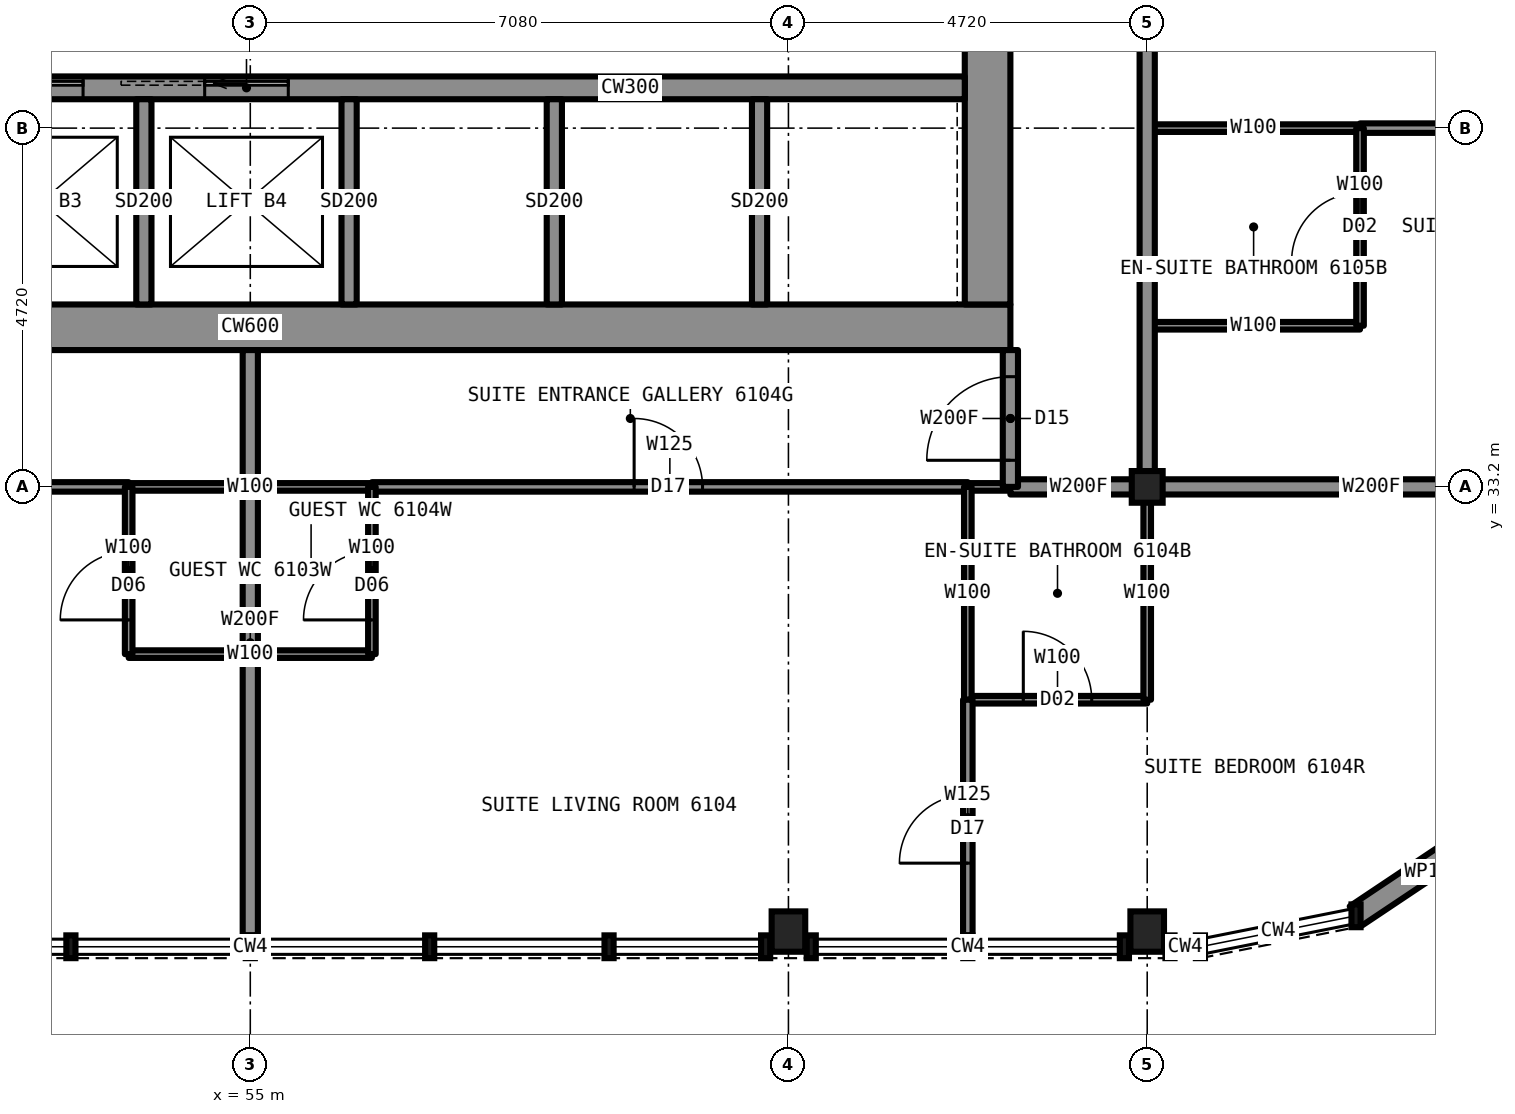
"""IFC4 building model, lengths in metres.
Left out: names, types, materials, properties, quantities, classifications, styles, units other than length and angle.
Written with IfcOpenShell. Run it as: python <this file> out.ifc"""

import sys

from ifc_helpers import new_model, si_unit, direction, frame, frame_2d, origin, origin_2d, place, context, subcontext, project, spatial, rectangle, i_section, extrude, element, fill, save


model = new_model("IFC4")
c1 = context("Model", 3, precision=1e-05, world=origin(), true_north=direction((0.0, 1.0)))
c2 = subcontext(c1, "Body", "Model", "MODEL_VIEW")
j1 = project(units=[si_unit("LENGTHUNIT", "METRE"), si_unit("PLANEANGLEUNIT", "RADIAN")], contexts=[c1])
p1 = place(None, origin())
s1 = spatial("IfcSite", under=j1, at=p1, CompositionType="ELEMENT")
p2 = place(p1, origin())
s2 = spatial("IfcBuilding", under=s1, at=p2, CompositionType="ELEMENT")
p3 = place(p2, frame((0.0, 0.0, 226.7)))
s3 = spatial("IfcBuildingStorey", under=s2, at=p3, CompositionType="ELEMENT", Elevation=226.7)
for number, where, z_axis, x_axis in (
    (1, (62.08, 27.35, 0.0), (0.0, 0.0, 1.0), (1.0, 0.0, 0.0)),
    (2, (66.8, 27.35, 0.0), (0.0, 0.0, 1.0), (1.0, 0.0, 0.0)),
):
    element("IfcColumn", number, at=place(p3, frame(where, z_axis=z_axis, x_axis=x_axis)), inside=s3, PredefinedType="COLUMN", context=c2, shape_type="SweptSolid", body=[
        extrude(i_section(OverallWidth=0.442, OverallDepth=0.531, WebThickness=0.066, FlangeThickness=0.106, at=origin_2d()), origin(), (0.0, 0.0, 1.0), 3.5),
    ])
p4 = place(p3, frame((66.8, 33.2, 0.0), z_axis=(0.0, 0.0, 1.0), x_axis=(1.0, 0.0, 0.0)))
e3 = element("IfcColumn", 3, at=p4, inside=s3, PredefinedType="COLUMN", context=c2, shape_type="SweptSolid", body=[
    extrude(i_section(OverallWidth=0.406, OverallDepth=0.417, WebThickness=0.03, FlangeThickness=0.048, at=origin_2d()), origin(), (0.0, 0.0, 1.0), 3.5),
])
p5 = place(p3, frame((45.0, 35.3, 0.0), z_axis=(0.0, 0.0, 1.0), x_axis=(1.0, 0.0, 0.0)))
e4 = element("IfcWall", 4, at=p5, inside=s3, PredefinedType="SHEAR", context=c2, shape_type="SweptSolid", body=[
    extrude(rectangle(XDim=20.0, YDim=0.6, at=frame_2d((10.0, 0.0))), origin(), (0.0, 0.0, 1.0), 3.5),
])
p6 = place(p3, frame((64.7, 35.6, 0.0), z_axis=(0.0, 0.0, 1.0), x_axis=(0.0, 1.0, 0.0)))
e5 = element("IfcWall", 5, at=p6, inside=s3, PredefinedType="SHEAR", context=c2, shape_type="SweptSolid", body=[
    extrude(rectangle(XDim=18.8, YDim=0.6, at=frame_2d((9.4, 0.0))), origin(), (0.0, 0.0, 1.0), 3.5),
])
p7 = place(p6, frame((13.4, 0.0, 0.0)))
e6 = element("IfcOpeningElement", 6, at=p7, cuts=e5, PredefinedType="OPENING", context=c2, shape_type="SweptSolid", body=[
    extrude(rectangle(XDim=1.8, YDim=2.2, at=frame_2d((0.9, 1.1))), frame((0.0, 0.31, 0.0), z_axis=(0.0, -1.0, 0.0), x_axis=(1.0, 0.0, 0.0)), (0.0, 0.0, 1.0), 0.62),
])
p8 = place(p6, frame((3.6, 0.0, 0.0)))
e7 = element("IfcOpeningElement", 7, at=p8, cuts=e5, PredefinedType="OPENING", context=c2, shape_type="SweptSolid", body=[
    extrude(rectangle(XDim=1.8, YDim=2.2, at=frame_2d((0.9, 1.1))), frame((0.0, 0.31, 0.0), z_axis=(0.0, -1.0, 0.0), x_axis=(1.0, 0.0, 0.0)), (0.0, 0.0, 1.0), 0.62),
])
p9 = place(p3, frame((45.6, 38.45, 0.0), z_axis=(0.0, 0.0, 1.0), x_axis=(1.0, 0.0, 0.0)))
e8 = element("IfcWall", 8, at=p9, inside=s3, PredefinedType="SHEAR", context=c2, shape_type="SweptSolid", body=[
    extrude(rectangle(XDim=18.8, YDim=0.3, at=frame_2d((9.4, 0.0))), origin(), (0.0, 0.0, 1.0), 3.5),
])
p10 = place(p9, frame((0.7, 0.0, 0.0)))
e9 = element("IfcOpeningElement", 9, at=p10, cuts=e8, PredefinedType="OPENING", context=c2, shape_type="SweptSolid", body=[
    extrude(rectangle(XDim=1.1, YDim=2.2, at=frame_2d((0.55, 1.1))), frame((0.0, 0.16, 0.0), z_axis=(0.0, -1.0, 0.0), x_axis=(1.0, 0.0, 0.0)), (0.0, 0.0, 1.0), 0.32),
])
p11 = place(p9, frame((3.4, 0.0, 0.0)))
e10 = element("IfcOpeningElement", 10, at=p11, cuts=e8, PredefinedType="OPENING", context=c2, shape_type="SweptSolid", body=[
    extrude(rectangle(XDim=1.1, YDim=2.2, at=frame_2d((0.55, 1.1))), frame((0.0, 0.16, 0.0), z_axis=(0.0, -1.0, 0.0), x_axis=(1.0, 0.0, 0.0)), (0.0, 0.0, 1.0), 0.32),
])
p12 = place(p9, frame((6.1, 0.0, 0.0)))
e11 = element("IfcOpeningElement", 11, at=p12, cuts=e8, PredefinedType="OPENING", context=c2, shape_type="SweptSolid", body=[
    extrude(rectangle(XDim=1.1, YDim=2.2, at=frame_2d((0.55, 1.1))), frame((0.0, 0.16, 0.0), z_axis=(0.0, -1.0, 0.0), x_axis=(1.0, 0.0, 0.0)), (0.0, 0.0, 1.0), 0.32),
])
p13 = place(p9, frame((8.8, 0.0, 0.0)))
e12 = element("IfcOpeningElement", 12, at=p13, cuts=e8, PredefinedType="OPENING", context=c2, shape_type="SweptSolid", body=[
    extrude(rectangle(XDim=1.1, YDim=2.2, at=frame_2d((0.55, 1.1))), frame((0.0, 0.16, 0.0), z_axis=(0.0, -1.0, 0.0), x_axis=(1.0, 0.0, 0.0)), (0.0, 0.0, 1.0), 0.32),
])
p14 = place(p3, frame((53.4, 33.2, 0.0), z_axis=(0.0, 0.0, 1.0), x_axis=(1.0, 0.0, 0.0)))
e13 = element("IfcWall", 13, at=p14, inside=s3, PredefinedType="PARTITIONING", context=c2, shape_type="SweptSolid", body=[
    extrude(rectangle(XDim=3.2, YDim=0.1, at=frame_2d((1.6, 0.0))), origin(), (0.0, 0.0, 1.0), 3.33),
])
p15 = place(p3, frame((64.44, 33.2, 0.0), z_axis=(0.0, 0.0, 1.0), x_axis=(1.0, 0.0, 0.0)))
e14 = element("IfcWall", 14, at=p15, inside=s3, PredefinedType="PARTITIONING", context=c2, shape_type="SweptSolid", body=[
    extrude(rectangle(XDim=0.56, YDim=0.1, at=frame_2d((0.28, 0.0))), origin(), (0.0, 0.0, 1.0), 3.33),
])
p16 = place(p3, frame((65.0, 33.2, 0.0), z_axis=(0.0, 0.0, 1.0), x_axis=(1.0, 0.0, 0.0)))
e15 = element("IfcWall", 15, at=p16, inside=s3, PredefinedType="PARTITIONING", context=c2, shape_type="SweptSolid", body=[
    extrude(rectangle(XDim=1.8, YDim=0.2, at=frame_2d((0.9, 0.0))), origin(), (0.0, 0.0, 1.0), 3.33),
])
p17 = place(p3, frame((66.8, 33.2, 0.0), z_axis=(0.0, 0.0, 1.0), x_axis=(1.0, 0.0, 0.0)))
e16 = element("IfcWall", 16, at=p17, inside=s3, PredefinedType="PARTITIONING", context=c2, shape_type="SweptSolid", body=[
    extrude(rectangle(XDim=5.9, YDim=0.2, at=frame_2d((2.95, 0.0))), origin(), (0.0, 0.0, 1.0), 2.573),
])
p18 = place(p3, frame((45.56, 33.2, 0.0), z_axis=(0.0, 0.0, 1.0), x_axis=(1.0, 0.0, 0.0)))
e17 = element("IfcWall", 17, at=p18, inside=s3, PredefinedType="PARTITIONING", context=c2, shape_type="SweptSolid", body=[
    extrude(rectangle(XDim=7.84, YDim=0.125, at=frame_2d((3.92, 0.0))), origin(), (0.0, 0.0, 1.0), 3.33),
])
p19 = place(p18, frame((3.49, 0.0, 0.0)))
e18 = element("IfcOpeningElement", 18, at=p19, cuts=e17, PredefinedType="OPENING", context=c2, shape_type="SweptSolid", body=[
    extrude(rectangle(XDim=0.9, YDim=2.2, at=frame_2d((0.45, 1.1))), frame((0.0, 0.073, 0.0), z_axis=(0.0, -1.0, 0.0), x_axis=(1.0, 0.0, 0.0)), (0.0, 0.0, 1.0), 0.145),
])
p20 = place(p3, frame((56.6, 33.2, 0.0), z_axis=(0.0, 0.0, 1.0), x_axis=(1.0, 0.0, 0.0)))
e19 = element("IfcWall", 19, at=p20, inside=s3, PredefinedType="PARTITIONING", context=c2, shape_type="SweptSolid", body=[
    extrude(rectangle(XDim=7.84, YDim=0.125, at=frame_2d((3.92, 0.0))), origin(), (0.0, 0.0, 1.0), 3.33),
])
p21 = place(p20, frame((3.45, 0.0, 0.0)))
e20 = element("IfcOpeningElement", 20, at=p21, cuts=e19, PredefinedType="OPENING", context=c2, shape_type="SweptSolid", body=[
    extrude(rectangle(XDim=0.9, YDim=2.2, at=frame_2d((0.45, 1.1))), frame((0.0, 0.073, 0.0), z_axis=(0.0, -1.0, 0.0), x_axis=(1.0, 0.0, 0.0)), (0.0, 0.0, 1.0), 0.145),
])
p22 = place(p3, frame((53.4, 31.0, 0.0), z_axis=(0.0, 0.0, 1.0), x_axis=(1.0, 0.0, 0.0)))
e21 = element("IfcWall", 21, at=p22, inside=s3, PredefinedType="PARTITIONING", context=c2, shape_type="SweptSolid", body=[
    extrude(rectangle(XDim=3.2, YDim=0.1, at=frame_2d((1.6, 0.0))), origin(), (0.0, 0.0, 1.0), 3.33),
])
p23 = place(p3, frame((64.44, 30.4, 0.0), z_axis=(0.0, 0.0, 1.0), x_axis=(1.0, 0.0, 0.0)))
e22 = element("IfcWall", 22, at=p23, inside=s3, PredefinedType="PARTITIONING", context=c2, shape_type="SweptSolid", body=[
    extrude(rectangle(XDim=2.36, YDim=0.1, at=frame_2d((1.18, 0.0))), origin(), (0.0, 0.0, 1.0), 3.33),
])
p24 = place(p23, frame((0.73, 0.0, 0.0)))
e23 = element("IfcOpeningElement", 23, at=p24, cuts=e22, PredefinedType="OPENING", context=c2, shape_type="SweptSolid", body=[
    extrude(rectangle(XDim=0.9, YDim=2.1, at=frame_2d((0.45, 1.05))), frame((0.0, 0.06, 0.0), z_axis=(0.0, -1.0, 0.0), x_axis=(1.0, 0.0, 0.0)), (0.0, 0.0, 1.0), 0.12),
])
p25 = place(p3, frame((66.8, 37.92, 0.0), z_axis=(0.0, 0.0, 1.0), x_axis=(1.0, 0.0, 0.0)))
e24 = element("IfcWall", 24, at=p25, inside=s3, PredefinedType="PARTITIONING", context=c2, shape_type="SweptSolid", body=[
    extrude(rectangle(XDim=2.8, YDim=0.1, at=frame_2d((1.4, 0.0))), origin(), (0.0, 0.0, 1.0), 2.573),
])
p26 = place(p3, frame((69.6, 37.92, 0.0), z_axis=(0.0, 0.0, 1.0), x_axis=(1.0, 0.0, 0.0)))
e25 = element("IfcWall", 25, at=p26, inside=s3, PredefinedType="PARTITIONING", context=c2, shape_type="SweptSolid", body=[
    extrude(rectangle(XDim=3.1, YDim=0.125, at=frame_2d((1.55, 0.0))), origin(), (0.0, 0.0, 1.0), 2.573),
])
p27 = place(p26, frame((1.25, 0.0, 0.0)))
e26 = element("IfcOpeningElement", 26, at=p27, cuts=e25, PredefinedType="OPENING", context=c2, shape_type="SweptSolid", body=[
    extrude(rectangle(XDim=0.9, YDim=2.2, at=frame_2d((0.45, 1.1))), frame((0.0, 0.073, 0.0), z_axis=(0.0, -1.0, 0.0), x_axis=(1.0, 0.0, 0.0)), (0.0, 0.0, 1.0), 0.145),
])
p28 = place(p3, frame((66.8, 35.32, 0.0), z_axis=(0.0, 0.0, 1.0), x_axis=(1.0, 0.0, 0.0)))
e27 = element("IfcWall", 27, at=p28, inside=s3, PredefinedType="PARTITIONING", context=c2, shape_type="SweptSolid", body=[
    extrude(rectangle(XDim=2.8, YDim=0.1, at=frame_2d((1.4, 0.0))), origin(), (0.0, 0.0, 1.0), 3.33),
])
p29 = place(p3, frame((53.4, 31.0, 0.0), z_axis=(0.0, 0.0, 1.0), x_axis=(0.0, 1.0, 0.0)))
e28 = element("IfcWall", 28, at=p29, inside=s3, PredefinedType="PARTITIONING", context=c2, shape_type="SweptSolid", body=[
    extrude(rectangle(XDim=2.2, YDim=0.1, at=frame_2d((1.1, 0.0))), origin(), (0.0, 0.0, 1.0), 3.33),
])
p30 = place(p29, frame((0.45, 0.0, 0.0)))
e29 = element("IfcOpeningElement", 29, at=p30, cuts=e28, PredefinedType="OPENING", context=c2, shape_type="SweptSolid", body=[
    extrude(rectangle(XDim=0.9, YDim=2.1, at=frame_2d((0.45, 1.05))), frame((0.0, 0.06, 0.0), z_axis=(0.0, -1.0, 0.0), x_axis=(1.0, 0.0, 0.0)), (0.0, 0.0, 1.0), 0.12),
])
p31 = place(p3, frame((55.0, 27.3, 0.0), z_axis=(0.0, 0.0, 1.0), x_axis=(0.0, 1.0, 0.0)))
e30 = element("IfcWall", 30, at=p31, inside=s3, PredefinedType="PARTITIONING", context=c2, shape_type="SweptSolid", body=[
    extrude(rectangle(XDim=7.7, YDim=0.2, at=frame_2d((3.85, 0.0))), origin(), (0.0, 0.0, 1.0), 2.573),
])
p32 = place(p3, frame((56.6, 31.0, 0.0), z_axis=(0.0, 0.0, 1.0), x_axis=(0.0, 1.0, 0.0)))
e31 = element("IfcWall", 31, at=p32, inside=s3, PredefinedType="PARTITIONING", context=c2, shape_type="SweptSolid", body=[
    extrude(rectangle(XDim=2.2, YDim=0.1, at=frame_2d((1.1, 0.0))), origin(), (0.0, 0.0, 1.0), 3.33),
])
p33 = place(p32, frame((0.45, 0.0, 0.0)))
e32 = element("IfcOpeningElement", 32, at=p33, cuts=e31, PredefinedType="OPENING", context=c2, shape_type="SweptSolid", body=[
    extrude(rectangle(XDim=0.9, YDim=2.1, at=frame_2d((0.45, 1.05))), frame((0.0, 0.06, 0.0), z_axis=(0.0, -1.0, 0.0), x_axis=(1.0, 0.0, 0.0)), (0.0, 0.0, 1.0), 0.12),
])
p34 = place(p3, frame((65.0, 33.2, 0.0), z_axis=(0.0, 0.0, 1.0), x_axis=(0.0, 1.0, 0.0)))
e33 = element("IfcWall", 33, at=p34, inside=s3, PredefinedType="PARTITIONING", context=c2, shape_type="SweptSolid", body=[
    extrude(rectangle(XDim=1.8, YDim=0.2, at=frame_2d((0.9, 0.0))), origin(), (0.0, 0.0, 1.0), 3.33),
])
p35 = place(p34, frame((0.35, 0.0, 0.0)))
e34 = element("IfcOpeningElement", 34, at=p35, cuts=e33, PredefinedType="OPENING", context=c2, shape_type="SweptSolid", body=[
    extrude(rectangle(XDim=1.1, YDim=2.2, at=frame_2d((0.55, 1.1))), frame((0.0, 0.11, 0.0), z_axis=(0.0, -1.0, 0.0), x_axis=(1.0, 0.0, 0.0)), (0.0, 0.0, 1.0), 0.22),
])
p36 = place(p3, frame((66.8, 30.4, 0.0), z_axis=(0.0, 0.0, 1.0), x_axis=(0.0, 1.0, 0.0)))
e35 = element("IfcWall", 35, at=p36, inside=s3, PredefinedType="PARTITIONING", context=c2, shape_type="SweptSolid", body=[
    extrude(rectangle(XDim=2.8, YDim=0.1, at=frame_2d((1.4, 0.0))), origin(), (0.0, 0.0, 1.0), 2.573),
])
p37 = place(p3, frame((66.8, 33.2, 0.0), z_axis=(0.0, 0.0, 1.0), x_axis=(0.0, 1.0, 0.0)))
e36 = element("IfcWall", 36, at=p37, inside=s3, PredefinedType="PARTITIONING", context=c2, shape_type="SweptSolid", body=[
    extrude(rectangle(XDim=23.6, YDim=0.2, at=frame_2d((11.8, 0.0))), origin(), (0.0, 0.0, 1.0), 3.33),
])
p38 = place(p37, frame((8.85, 0.0, 0.0)))
e37 = element("IfcOpeningElement", 37, at=p38, cuts=e36, PredefinedType="OPENING", context=c2, shape_type="SweptSolid", body=[
    extrude(rectangle(XDim=1.1, YDim=2.2, at=frame_2d((0.55, 1.1))), frame((0.0, 0.11, 0.0), z_axis=(0.0, -1.0, 0.0), x_axis=(1.0, 0.0, 0.0)), (0.0, 0.0, 1.0), 0.22),
])
p39 = place(p37, frame((13.65, 0.0, 0.0)))
e38 = element("IfcOpeningElement", 38, at=p39, cuts=e36, PredefinedType="OPENING", context=c2, shape_type="SweptSolid", body=[
    extrude(rectangle(XDim=1.1, YDim=2.2, at=frame_2d((0.55, 1.1))), frame((0.0, 0.11, 0.0), z_axis=(0.0, -1.0, 0.0), x_axis=(1.0, 0.0, 0.0)), (0.0, 0.0, 1.0), 0.22),
])
p40 = place(p3, frame((69.6, 35.32, 0.0), z_axis=(0.0, 0.0, 1.0), x_axis=(0.0, 1.0, 0.0)))
e39 = element("IfcWall", 39, at=p40, inside=s3, PredefinedType="PARTITIONING", context=c2, shape_type="SweptSolid", body=[
    extrude(rectangle(XDim=2.6, YDim=0.1, at=frame_2d((1.3, 0.0))), origin(), (0.0, 0.0, 1.0), 3.33),
])
p41 = place(p40, frame((0.85, 0.0, 0.0)))
e40 = element("IfcOpeningElement", 40, at=p41, cuts=e39, PredefinedType="OPENING", context=c2, shape_type="SweptSolid", body=[
    extrude(rectangle(XDim=0.9, YDim=2.1, at=frame_2d((0.45, 1.05))), frame((0.0, 0.06, 0.0), z_axis=(0.0, -1.0, 0.0), x_axis=(1.0, 0.0, 0.0)), (0.0, 0.0, 1.0), 0.12),
])
p42 = place(p3, frame((64.44, 30.4, 0.0), z_axis=(0.0, 0.0, 1.0), x_axis=(0.0, 1.0, 0.0)))
e41 = element("IfcWall", 41, at=p42, inside=s3, PredefinedType="PARTITIONING", context=c2, shape_type="SweptSolid", body=[
    extrude(rectangle(XDim=2.8, YDim=0.1, at=frame_2d((1.4, 0.0))), origin(), (0.0, 0.0, 1.0), 3.33),
])
p43 = place(p3, frame((64.44, 27.3, 0.0), z_axis=(0.0, 0.0, 1.0), x_axis=(0.0, 1.0, 0.0)))
e42 = element("IfcWall", 42, at=p43, inside=s3, PredefinedType="PARTITIONING", context=c2, shape_type="SweptSolid", body=[
    extrude(rectangle(XDim=3.1, YDim=0.125, at=frame_2d((1.55, 0.0))), origin(), (0.0, 0.0, 1.0), 3.33),
])
p44 = place(p43, frame((0.95, 0.0, 0.0)))
e43 = element("IfcOpeningElement", 43, at=p44, cuts=e42, PredefinedType="OPENING", context=c2, shape_type="SweptSolid", body=[
    extrude(rectangle(XDim=0.9, YDim=2.2, at=frame_2d((0.45, 1.1))), frame((0.0, 0.073, 0.0), z_axis=(0.0, -1.0, 0.0), x_axis=(1.0, 0.0, 0.0)), (0.0, 0.0, 1.0), 0.145),
])
for number, where, z_axis, x_axis in (
    (44, (53.6, 35.6, 0.0), (0.0, 0.0, 1.0), (0.0, 1.0, 0.0)),
    (45, (56.3, 35.6, 0.0), (0.0, 0.0, 1.0), (0.0, 1.0, 0.0)),
    (46, (59.0, 35.6, 0.0), (0.0, 0.0, 1.0), (0.0, 1.0, 0.0)),
    (47, (61.7, 35.6, 0.0), (0.0, 0.0, 1.0), (0.0, 1.0, 0.0)),
):
    element("IfcWall", number, at=place(p3, frame(where, z_axis=z_axis, x_axis=x_axis)), inside=s3, PredefinedType="PARTITIONING", context=c2, shape_type="SweptSolid", body=[
        extrude(rectangle(XDim=2.7, YDim=0.2, at=frame_2d((1.35, 0.0))), origin(), (0.0, 0.0, 1.0), 3.33),
    ])
p45 = place(p3, frame((69.547, 27.557, 0.0), z_axis=(0.0, 0.0, 1.0), x_axis=(0.831420010345, 0.555644460423, 0.0)))
e48 = element("IfcWall", 48, at=p45, inside=s3, PredefinedType="SOLIDWALL", context=c2, shape_type="SweptSolid", body=[
    extrude(rectangle(XDim=2.087, YDim=0.3, at=frame_2d((1.044, 0.0))), origin(), (0.0, 0.0, 1.0), 2.83),
])
p46 = place(p30, origin())
e49 = element("IfcDoor", 49, at=p46, inside=s3, OperationType="SINGLE_SWING_LEFT", PredefinedType="DOOR", context=c2, shape_type="SweptSolid", body=[
    extrude(rectangle(XDim=0.9, YDim=2.1, at=frame_2d((0.45, 1.05))), frame((0.0, 0.025, 0.0), z_axis=(0.0, -1.0, 0.0), x_axis=(1.0, 0.0, 0.0)), (0.0, 0.0, 1.0), 0.05),
])
fill(e29, e49)
p47 = place(p21, origin())
e50 = element("IfcDoor", 50, at=p47, inside=s3, OperationType="SINGLE_SWING_LEFT", PredefinedType="DOOR", context=c2, shape_type="SweptSolid", body=[
    extrude(rectangle(XDim=0.9, YDim=2.2, at=frame_2d((0.45, 1.1))), frame((0.0, 0.025, 0.0), z_axis=(0.0, -1.0, 0.0), x_axis=(1.0, 0.0, 0.0)), (0.0, 0.0, 1.0), 0.05),
])
fill(e20, e50)
p48 = place(p24, origin())
e51 = element("IfcDoor", 51, at=p48, inside=s3, OperationType="SINGLE_SWING_RIGHT", PredefinedType="DOOR", context=c2, shape_type="SweptSolid", body=[
    extrude(rectangle(XDim=0.9, YDim=2.1, at=frame_2d((0.45, 1.05))), frame((0.0, 0.025, 0.0), z_axis=(0.0, -1.0, 0.0), x_axis=(1.0, 0.0, 0.0)), (0.0, 0.0, 1.0), 0.05),
])
fill(e23, e51)
p49 = place(p35, origin())
e52 = element("IfcDoor", 52, at=p49, inside=s3, OperationType="SINGLE_SWING_LEFT", PredefinedType="DOOR", context=c2, shape_type="SweptSolid", body=[
    extrude(rectangle(XDim=1.1, YDim=2.2, at=frame_2d((0.55, 1.1))), frame((0.0, 0.025, 0.0), z_axis=(0.0, -1.0, 0.0), x_axis=(1.0, 0.0, 0.0)), (0.0, 0.0, 1.0), 0.05),
])
fill(e34, e52)
p50 = place(p44, origin())
e53 = element("IfcDoor", 53, at=p50, inside=s3, OperationType="SINGLE_SWING_LEFT", PredefinedType="DOOR", context=c2, shape_type="SweptSolid", body=[
    extrude(rectangle(XDim=0.9, YDim=2.2, at=frame_2d((0.45, 1.1))), frame((0.0, 0.025, 0.0), z_axis=(0.0, -1.0, 0.0), x_axis=(1.0, 0.0, 0.0)), (0.0, 0.0, 1.0), 0.05),
])
fill(e43, e53)
p51 = place(p33, origin())
e54 = element("IfcDoor", 54, at=p51, inside=s3, OperationType="SINGLE_SWING_LEFT", PredefinedType="DOOR", context=c2, shape_type="SweptSolid", body=[
    extrude(rectangle(XDim=0.9, YDim=2.1, at=frame_2d((0.45, 1.05))), frame((0.0, 0.025, 0.0), z_axis=(0.0, -1.0, 0.0), x_axis=(1.0, 0.0, 0.0)), (0.0, 0.0, 1.0), 0.05),
])
fill(e32, e54)
p52 = place(p41, origin())
e55 = element("IfcDoor", 55, at=p52, inside=s3, OperationType="SINGLE_SWING_RIGHT", PredefinedType="DOOR", context=c2, shape_type="SweptSolid", body=[
    extrude(rectangle(XDim=0.9, YDim=2.1, at=frame_2d((0.45, 1.05))), frame((0.0, 0.025, 0.0), z_axis=(0.0, -1.0, 0.0), x_axis=(1.0, 0.0, 0.0)), (0.0, 0.0, 1.0), 0.05),
])
fill(e40, e55)
p53 = place(p12, origin())
e56 = element("IfcDoor", 56, at=p53, inside=s3, OperationType="SLIDING_TO_LEFT", PredefinedType="DOOR", context=c2, shape_type="SweptSolid", body=[
    extrude(rectangle(XDim=1.1, YDim=2.2, at=frame_2d((0.55, 1.1))), frame((0.0, 0.025, 0.0), z_axis=(0.0, -1.0, 0.0), x_axis=(1.0, 0.0, 0.0)), (0.0, 0.0, 1.0), 0.05),
])
fill(e11, e56)
p54 = place(p13, origin())
e57 = element("IfcDoor", 57, at=p54, inside=s3, OperationType="SLIDING_TO_LEFT", PredefinedType="DOOR", context=c2, shape_type="SweptSolid", body=[
    extrude(rectangle(XDim=1.1, YDim=2.2, at=frame_2d((0.55, 1.1))), frame((0.0, 0.025, 0.0), z_axis=(0.0, -1.0, 0.0), x_axis=(1.0, 0.0, 0.0)), (0.0, 0.0, 1.0), 0.05),
])
fill(e12, e57)
save(model, sys.argv[1])
